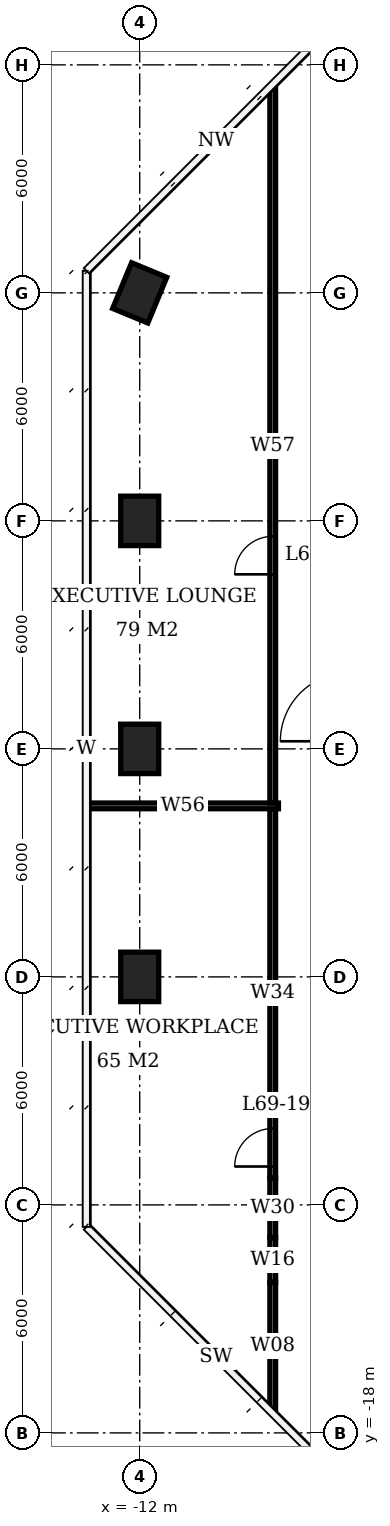
"""IFC4 building model, lengths in metres.
Left out: names, types, materials, properties, quantities, classifications, styles, units other than length and angle.
Written with IfcOpenShell. Run it as: python <this file> out.ifc"""

import sys

from ifc_helpers import new_model, si_unit, direction, frame, frame_2d, origin, origin_2d, place, context, subcontext, project, spatial, rectangle, extrude, element, fill, save


model = new_model("IFC4")
c1 = context("Model", 3, precision=1e-05, world=origin(), true_north=direction((0.0, 1.0)))
c2 = subcontext(c1, "Body", "Model", "MODEL_VIEW")
j1 = project(units=[si_unit("LENGTHUNIT", "METRE"), si_unit("PLANEANGLEUNIT", "RADIAN")], contexts=[c1])
p1 = place(None, origin())
s1 = spatial("IfcSite", under=j1, at=p1, CompositionType="ELEMENT")
p2 = place(p1, origin())
s2 = spatial("IfcBuilding", under=s1, at=p2, CompositionType="ELEMENT")
p3 = place(p2, frame((0.0, 0.0, 280.1)))
s3 = spatial("IfcBuildingStorey", under=s2, at=p3, CompositionType="ELEMENT", Elevation=280.1)
for number, where, z_axis, x_axis in (
    (1, (-12.0, -6.0, 0.0), (0.0, 0.0, 1.0), (0.0, 1.0, 0.0)),
    (2, (-12.0, 0.0, 0.0), (0.0, 0.0, 1.0), (0.0, 1.0, 0.0)),
    (3, (-12.0, 6.0, 0.0), (0.0, 0.0, 1.0), (0.0, 1.0, 0.0)),
    (4, (-12.0, 12.0, 0.0), (0.0, 0.0, 1.0), (0.383, 0.924, 0.0)),
):
    element("IfcColumn", number, at=place(p3, frame(where, z_axis=z_axis, x_axis=x_axis)), inside=s3, PredefinedType="COLUMN", context=c2, shape_type="SweptSolid", body=[
        extrude(rectangle(XDim=1.3, YDim=1.0, at=origin_2d()), origin(), (0.0, 0.0, 1.0), 3.9),
    ])
p4 = place(p3, frame((-13.375, -1.5, 0.0), z_axis=(0.0, 0.0, 1.0), x_axis=(1.0, 0.0, 0.0)))
e5 = element("IfcWall", 5, at=p4, inside=s3, PredefinedType="PARTITIONING", context=c2, shape_type="SweptSolid", body=[
    extrude(rectangle(XDim=5.025, YDim=0.15, at=frame_2d((2.512, 0.0))), origin(), (0.0, 0.0, 1.0), 3.65),
])
p5 = place(p3, frame((-8.5, -17.363, 0.0), z_axis=(0.0, 0.0, 1.0), x_axis=(0.0, 1.0, 0.0)))
e6 = element("IfcWall", 6, at=p5, inside=s3, PredefinedType="PARTITIONING", context=c2, shape_type="SweptSolid", body=[
    extrude(rectangle(XDim=3.323, YDim=0.15, at=frame_2d((1.662, 0.0))), origin(), (0.0, 0.0, 1.0), 3.65),
])
p6 = place(p3, frame((-8.5, -14.04, 0.0), z_axis=(0.0, 0.0, 1.0), x_axis=(0.0, 1.0, 0.0)))
e7 = element("IfcWall", 7, at=p6, inside=s3, PredefinedType="PARTITIONING", context=c2, shape_type="SweptSolid", body=[
    extrude(rectangle(XDim=1.18, YDim=0.15, at=frame_2d((0.59, 0.0))), origin(), (0.0, 0.0, 1.0), 2.65),
])
p7 = place(p3, frame((-8.5, -12.86, 0.0), z_axis=(0.0, 0.0, 1.0), x_axis=(0.0, 1.0, 0.0)))
e8 = element("IfcWall", 8, at=p7, inside=s3, PredefinedType="PARTITIONING", context=c2, shape_type="SweptSolid", body=[
    extrude(rectangle(XDim=1.57, YDim=0.15, at=frame_2d((0.785, 0.0))), origin(), (0.0, 0.0, 1.0), 2.65),
])
p8 = place(p3, frame((-8.5, -11.29, 0.0), z_axis=(0.0, 0.0, 1.0), x_axis=(0.0, 1.0, 0.0)))
e9 = element("IfcWall", 9, at=p8, inside=s3, PredefinedType="PARTITIONING", context=c2, shape_type="SweptSolid", body=[
    extrude(rectangle(XDim=9.715, YDim=0.15, at=frame_2d((4.857, 0.0))), origin(), (0.0, 0.0, 1.0), 3.65),
])
p9 = place(p8, frame((0.3, 0.0, 0.0)))
e10 = element("IfcOpeningElement", 10, at=p9, cuts=e9, PredefinedType="OPENING", context=c2, shape_type="SweptSolid", body=[
    extrude(rectangle(XDim=1.0, YDim=2.4, at=frame_2d((0.5, 1.2))), frame((0.0, 0.085, 0.0), z_axis=(0.0, -1.0, 0.0), x_axis=(1.0, 0.0, 0.0)), (0.0, 0.0, 1.0), 0.17),
])
p10 = place(p3, frame((-8.5, -1.425, 0.0), z_axis=(0.0, 0.0, 1.0), x_axis=(0.0, 1.0, 0.0)))
e11 = element("IfcWall", 11, at=p10, inside=s3, PredefinedType="PARTITIONING", context=c2, shape_type="SweptSolid", body=[
    extrude(rectangle(XDim=18.788, YDim=0.15, at=frame_2d((9.394, 0.0))), origin(), (0.0, 0.0, 1.0), 3.65),
])
p11 = place(p10, frame((6.018, 0.0, 0.0)))
e12 = element("IfcOpeningElement", 12, at=p11, cuts=e11, PredefinedType="OPENING", context=c2, shape_type="SweptSolid", body=[
    extrude(rectangle(XDim=1.0, YDim=2.4, at=frame_2d((0.5, 1.2))), frame((0.0, 0.085, 0.0), z_axis=(0.0, -1.0, 0.0), x_axis=(1.0, 0.0, 0.0)), (0.0, 0.0, 1.0), 0.17),
])
p12 = place(p9, origin())
e13 = element("IfcDoor", 13, at=p12, inside=s3, OperationType="SINGLE_SWING_LEFT", PredefinedType="DOOR", context=c2, shape_type="SweptSolid", body=[
    extrude(rectangle(XDim=1.0, YDim=2.4, at=frame_2d((0.5, 1.2))), frame((0.0, 0.025, 0.0), z_axis=(0.0, -1.0, 0.0), x_axis=(1.0, 0.0, 0.0)), (0.0, 0.0, 1.0), 0.05),
])
fill(e10, e13)
p13 = place(p11, origin())
e14 = element("IfcDoor", 14, at=p13, inside=s3, OperationType="SINGLE_SWING_LEFT", PredefinedType="DOOR", context=c2, shape_type="SweptSolid", body=[
    extrude(rectangle(XDim=1.0, YDim=2.4, at=frame_2d((0.5, 1.2))), frame((0.0, 0.025, 0.0), z_axis=(0.0, -1.0, 0.0), x_axis=(1.0, 0.0, 0.0)), (0.0, 0.0, 1.0), 0.05),
])
fill(e12, e14)
save(model, sys.argv[1])
